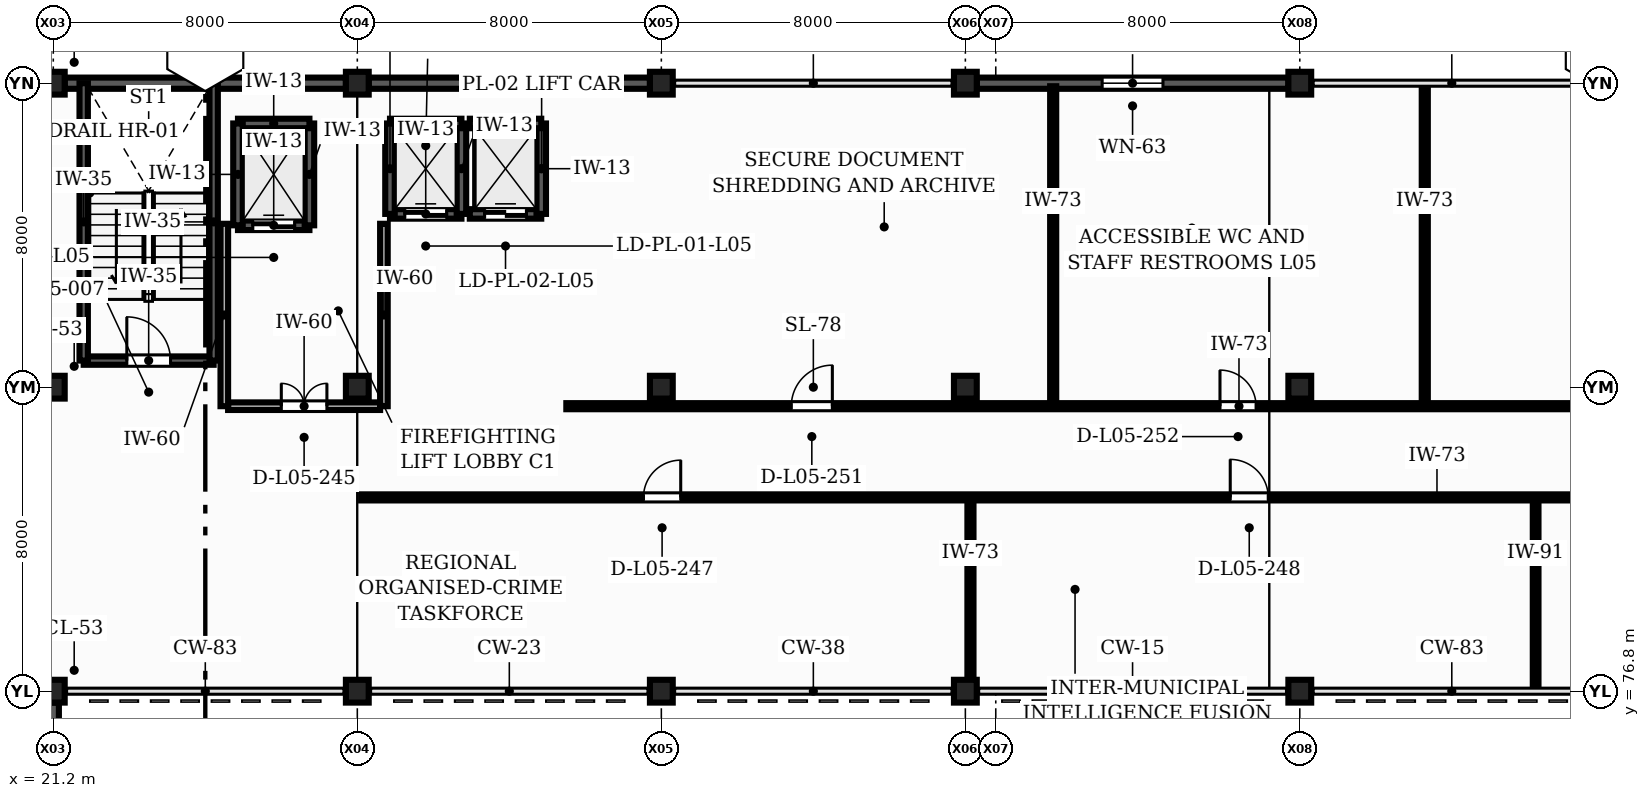
"""IFC4 building model, lengths in metres.
Left out: names, types, materials, properties, quantities, classifications, styles, units other than length and angle.
Written with IfcOpenShell. Run it as: python <this file> out.ifc"""

import sys

from ifc_helpers import new_model, si_unit, direction, frame, frame_2d, origin, origin_2d, place, context, subcontext, project, spatial, rectangle, extrude, element, fill, save


model = new_model("IFC4")
c1 = context("Model", 3, precision=1e-05, world=origin(), true_north=direction((0.0, 1.0)))
c2 = subcontext(c1, "Body", "Model", "MODEL_VIEW")
j1 = project(units=[si_unit("LENGTHUNIT", "METRE"), si_unit("PLANEANGLEUNIT", "RADIAN")], contexts=[c1])
p1 = place(None, origin())
s1 = spatial("IfcSite", under=j1, at=p1, CompositionType="ELEMENT")
p2 = place(p1, origin())
s2 = spatial("IfcBuilding", under=s1, at=p2, CompositionType="ELEMENT")
p3 = place(p2, frame((0.0, 0.0, 21.9)))
s3 = spatial("IfcBuildingStorey", under=s2, at=p3, CompositionType="ELEMENT", Elevation=21.9)
for number, where, z_axis, x_axis in (
    (1, (21.2, 76.8, 0.0), (0.0, 0.0, 1.0), (1.0, 0.0, 0.0)),
    (2, (21.2, 84.8, 0.0), (0.0, 0.0, 1.0), (1.0, 0.0, 0.0)),
    (3, (21.2, 92.8, 0.0), (0.0, 0.0, 1.0), (1.0, 0.0, 0.0)),
    (4, (29.2, 76.8, 0.0), (0.0, 0.0, 1.0), (1.0, 0.0, 0.0)),
    (5, (29.2, 84.8, 0.0), (0.0, 0.0, 1.0), (1.0, 0.0, 0.0)),
    (6, (29.2, 92.8, 0.0), (0.0, 0.0, 1.0), (1.0, 0.0, 0.0)),
    (7, (37.2, 76.8, 0.0), (0.0, 0.0, 1.0), (1.0, 0.0, 0.0)),
    (8, (37.2, 84.8, 0.0), (0.0, 0.0, 1.0), (1.0, 0.0, 0.0)),
    (9, (37.2, 92.8, 0.0), (0.0, 0.0, 1.0), (1.0, 0.0, 0.0)),
    (10, (45.2, 76.8, 0.0), (0.0, 0.0, 1.0), (1.0, 0.0, 0.0)),
    (11, (45.2, 84.8, 0.0), (0.0, 0.0, 1.0), (1.0, 0.0, 0.0)),
    (12, (45.2, 92.8, 0.0), (0.0, 0.0, 1.0), (1.0, 0.0, 0.0)),
    (13, (54.0, 76.8, 0.0), (0.0, 0.0, 1.0), (1.0, 0.0, 0.0)),
    (14, (54.0, 84.8, 0.0), (0.0, 0.0, 1.0), (1.0, 0.0, 0.0)),
    (15, (54.0, 92.8, 0.0), (0.0, 0.0, 1.0), (1.0, 0.0, 0.0)),
):
    element("IfcColumn", number, at=place(p3, frame(where, z_axis=z_axis, x_axis=x_axis)), inside=s3, PredefinedType="COLUMN", context=c2, shape_type="SweptSolid", body=[
        extrude(rectangle(XDim=0.6, YDim=0.6, at=origin_2d()), origin(), (0.0, 0.0, 1.0), 3.9),
    ])
p4 = place(p3, frame((21.2, 69.05, 0.0), z_axis=(0.0, 0.0, 1.0), x_axis=(0.0, 1.0, 0.0)))
e16 = element("IfcWall", 16, at=p4, inside=s3, PredefinedType="SOLIDWALL", context=c2, shape_type="SweptSolid", body=[
    extrude(rectangle(XDim=7.45, YDim=0.295, at=frame_2d((3.725, 0.0))), origin(), (0.0, 0.0, 1.0), 3.0),
])
p5 = place(p4, frame((2.725, 0.0, 0.9)))
e17 = element("IfcOpeningElement", 17, at=p5, cuts=e16, PredefinedType="OPENING", context=c2, shape_type="SweptSolid", body=[
    extrude(rectangle(XDim=2.0, YDim=1.5, at=frame_2d((1.0, 0.75))), frame((0.0, 0.157, 0.0), z_axis=(0.0, -1.0, 0.0), x_axis=(1.0, 0.0, 0.0)), (0.0, 0.0, 1.0), 0.315),
])
p6 = place(p3, frame((53.7, 92.8, 0.0), z_axis=(0.0, 0.0, 1.0), x_axis=(-1.0, 0.0, 0.0)))
e18 = element("IfcWall", 18, at=p6, inside=s3, PredefinedType="SOLIDWALL", context=c2, shape_type="SweptSolid", body=[
    extrude(rectangle(XDim=8.2, YDim=0.295, at=frame_2d((4.1, 0.0))), origin(), (0.0, 0.0, 1.0), 3.0),
])
p7 = place(p6, frame((3.3, 0.0, 0.9)))
e19 = element("IfcOpeningElement", 19, at=p7, cuts=e18, PredefinedType="OPENING", context=c2, shape_type="SweptSolid", body=[
    extrude(rectangle(XDim=1.6, YDim=1.25, at=frame_2d((0.8, 0.625))), frame((0.0, 0.157, 0.0), z_axis=(0.0, -1.0, 0.0), x_axis=(1.0, 0.0, 0.0)), (0.0, 0.0, 1.0), 0.315),
])
p8 = place(p3, frame((36.9, 92.8, 0.0), z_axis=(0.0, 0.0, 1.0), x_axis=(-1.0, 0.0, 0.0)))
e20 = element("IfcWall", 20, at=p8, inside=s3, PredefinedType="SOLIDWALL", context=c2, shape_type="SweptSolid", body=[
    extrude(rectangle(XDim=7.4, YDim=0.295, at=frame_2d((3.7, 0.0))), origin(), (0.0, 0.0, 1.0), 3.0),
])
p9 = place(p3, frame((28.9, 92.8, 0.0), z_axis=(0.0, 0.0, 1.0), x_axis=(-1.0, 0.0, 0.0)))
e21 = element("IfcWall", 21, at=p9, inside=s3, PredefinedType="SOLIDWALL", context=c2, shape_type="SweptSolid", body=[
    extrude(rectangle(XDim=7.4, YDim=0.295, at=frame_2d((3.7, 0.0))), origin(), (0.0, 0.0, 1.0), 3.65),
])
p10 = place(p3, frame((22.0, 85.5, 0.0), z_axis=(0.0, 0.0, 1.0), x_axis=(1.0, 0.0, 0.0)))
e22 = element("IfcWall", 22, at=p10, inside=s3, PredefinedType="SHEAR", context=c2, shape_type="SweptSolid", body=[
    extrude(rectangle(XDim=3.42, YDim=0.22, at=frame_2d((1.71, 0.0))), origin(), (0.0, 0.0, 1.0), 3.9),
])
p11 = place(p10, frame((1.135, 0.0, 0.0)))
e23 = element("IfcOpeningElement", 23, at=p11, cuts=e22, PredefinedType="OPENING", context=c2, shape_type="SweptSolid", body=[
    extrude(rectangle(XDim=1.15, YDim=2.15, at=frame_2d((0.575, 1.075))), frame((0.0, 0.12, 0.0), z_axis=(0.0, -1.0, 0.0), x_axis=(1.0, 0.0, 0.0)), (0.0, 0.0, 1.0), 0.24),
])
for number, where, z_axis, x_axis in (
    (24, (25.42, 85.5, 0.0), (0.0, 0.0, 1.0), (0.0, 1.0, 0.0)),
    (25, (22.0, 92.8, 0.0), (0.0, 0.0, 1.0), (0.0, -1.0, 0.0)),
):
    element("IfcWall", number, at=place(p3, frame(where, z_axis=z_axis, x_axis=x_axis)), inside=s3, PredefinedType="SHEAR", context=c2, shape_type="SweptSolid", body=[
        extrude(rectangle(XDim=7.3, YDim=0.22, at=frame_2d((3.65, 0.0))), origin(), (0.0, 0.0, 1.0), 3.9),
    ])
p12 = place(p3, frame((26.06, 89.06, 0.0), z_axis=(0.0, 0.0, 1.0), x_axis=(1.0, 0.0, 0.0)))
e26 = element("IfcWall", 26, at=p12, inside=s3, PredefinedType="SHEAR", context=c2, shape_type="SweptSolid", body=[
    extrude(rectangle(XDim=1.88, YDim=0.25, at=frame_2d((0.94, 0.0))), origin(), (0.0, 0.0, 1.0), 3.9),
])
p13 = place(p12, frame((0.39, 0.0, 0.0)))
e27 = element("IfcOpeningElement", 27, at=p13, cuts=e26, PredefinedType="OPENING", context=c2, shape_type="SweptSolid", body=[
    extrude(rectangle(XDim=1.1, YDim=2.2, at=frame_2d((0.55, 1.1))), frame((0.0, 0.135, 0.0), z_axis=(0.0, -1.0, 0.0), x_axis=(1.0, 0.0, 0.0)), (0.0, 0.0, 1.0), 0.27),
])
p14 = place(p3, frame((27.94, 89.06, 0.0), z_axis=(0.0, 0.0, 1.0), x_axis=(0.0, 1.0, 0.0)))
e28 = element("IfcWall", 28, at=p14, inside=s3, PredefinedType="SHEAR", context=c2, shape_type="SweptSolid", body=[
    extrude(rectangle(XDim=2.68, YDim=0.25, at=frame_2d((1.34, 0.0))), origin(), (0.0, 0.0, 1.0), 3.9),
])
p15 = place(p3, frame((27.94, 91.74, 0.0), z_axis=(0.0, 0.0, 1.0), x_axis=(-1.0, 0.0, 0.0)))
e29 = element("IfcWall", 29, at=p15, inside=s3, PredefinedType="SHEAR", context=c2, shape_type="SweptSolid", body=[
    extrude(rectangle(XDim=1.88, YDim=0.25, at=frame_2d((0.94, 0.0))), origin(), (0.0, 0.0, 1.0), 3.9),
])
p16 = place(p3, frame((26.06, 91.74, 0.0), z_axis=(0.0, 0.0, 1.0), x_axis=(0.0, -1.0, 0.0)))
e30 = element("IfcWall", 30, at=p16, inside=s3, PredefinedType="SHEAR", context=c2, shape_type="SweptSolid", body=[
    extrude(rectangle(XDim=2.68, YDim=0.25, at=frame_2d((1.34, 0.0))), origin(), (0.0, 0.0, 1.0), 3.9),
])
p17 = place(p3, frame((30.06, 89.36, 0.0), z_axis=(0.0, 0.0, 1.0), x_axis=(1.0, 0.0, 0.0)))
e31 = element("IfcWall", 31, at=p17, inside=s3, PredefinedType="SHEAR", context=c2, shape_type="SweptSolid", body=[
    extrude(rectangle(XDim=1.88, YDim=0.25, at=frame_2d((0.94, 0.0))), origin(), (0.0, 0.0, 1.0), 3.9),
])
p18 = place(p17, frame((0.39, 0.0, 0.0)))
e32 = element("IfcOpeningElement", 32, at=p18, cuts=e31, PredefinedType="OPENING", context=c2, shape_type="SweptSolid", body=[
    extrude(rectangle(XDim=1.1, YDim=2.2, at=frame_2d((0.55, 1.1))), frame((0.0, 0.135, 0.0), z_axis=(0.0, -1.0, 0.0), x_axis=(1.0, 0.0, 0.0)), (0.0, 0.0, 1.0), 0.27),
])
p19 = place(p3, frame((31.94, 89.36, 0.0), z_axis=(0.0, 0.0, 1.0), x_axis=(0.0, 1.0, 0.0)))
e33 = element("IfcWall", 33, at=p19, inside=s3, PredefinedType="SHEAR", context=c2, shape_type="SweptSolid", body=[
    extrude(rectangle(XDim=2.38, YDim=0.25, at=frame_2d((1.19, 0.0))), origin(), (0.0, 0.0, 1.0), 3.9),
])
p20 = place(p3, frame((31.94, 91.74, 0.0), z_axis=(0.0, 0.0, 1.0), x_axis=(-1.0, 0.0, 0.0)))
e34 = element("IfcWall", 34, at=p20, inside=s3, PredefinedType="SHEAR", context=c2, shape_type="SweptSolid", body=[
    extrude(rectangle(XDim=1.88, YDim=0.25, at=frame_2d((0.94, 0.0))), origin(), (0.0, 0.0, 1.0), 3.9),
])
p21 = place(p3, frame((30.06, 91.74, 0.0), z_axis=(0.0, 0.0, 1.0), x_axis=(0.0, -1.0, 0.0)))
e35 = element("IfcWall", 35, at=p21, inside=s3, PredefinedType="SHEAR", context=c2, shape_type="SweptSolid", body=[
    extrude(rectangle(XDim=2.38, YDim=0.25, at=frame_2d((1.19, 0.0))), origin(), (0.0, 0.0, 1.0), 3.9),
])
p22 = place(p3, frame((32.16, 89.36, 0.0), z_axis=(0.0, 0.0, 1.0), x_axis=(1.0, 0.0, 0.0)))
e36 = element("IfcWall", 36, at=p22, inside=s3, PredefinedType="SHEAR", context=c2, shape_type="SweptSolid", body=[
    extrude(rectangle(XDim=1.88, YDim=0.25, at=frame_2d((0.94, 0.0))), origin(), (0.0, 0.0, 1.0), 3.9),
])
p23 = place(p22, frame((0.39, 0.0, 0.0)))
e37 = element("IfcOpeningElement", 37, at=p23, cuts=e36, PredefinedType="OPENING", context=c2, shape_type="SweptSolid", body=[
    extrude(rectangle(XDim=1.1, YDim=2.2, at=frame_2d((0.55, 1.1))), frame((0.0, 0.135, 0.0), z_axis=(0.0, -1.0, 0.0), x_axis=(1.0, 0.0, 0.0)), (0.0, 0.0, 1.0), 0.27),
])
p24 = place(p3, frame((34.04, 89.36, 0.0), z_axis=(0.0, 0.0, 1.0), x_axis=(0.0, 1.0, 0.0)))
e38 = element("IfcWall", 38, at=p24, inside=s3, PredefinedType="SHEAR", context=c2, shape_type="SweptSolid", body=[
    extrude(rectangle(XDim=2.38, YDim=0.25, at=frame_2d((1.19, 0.0))), origin(), (0.0, 0.0, 1.0), 3.9),
])
p25 = place(p3, frame((34.04, 91.74, 0.0), z_axis=(0.0, 0.0, 1.0), x_axis=(-1.0, 0.0, 0.0)))
e39 = element("IfcWall", 39, at=p25, inside=s3, PredefinedType="SHEAR", context=c2, shape_type="SweptSolid", body=[
    extrude(rectangle(XDim=1.88, YDim=0.25, at=frame_2d((0.94, 0.0))), origin(), (0.0, 0.0, 1.0), 3.9),
])
p26 = place(p3, frame((25.8, 84.3, 0.0), z_axis=(0.0, 0.0, 1.0), x_axis=(1.0, 0.0, 0.0)))
e40 = element("IfcWall", 40, at=p26, inside=s3, PredefinedType="PARTITIONING", context=c2, shape_type="SweptSolid", body=[
    extrude(rectangle(XDim=4.0, YDim=0.2, at=frame_2d((2.0, 0.0))), origin(), (0.0, 0.0, 1.0), 2.785),
])
p27 = place(p26, frame((1.4, 0.0, 0.0)))
e41 = element("IfcOpeningElement", 41, at=p27, cuts=e40, PredefinedType="OPENING", context=c2, shape_type="SweptSolid", body=[
    extrude(rectangle(XDim=1.2, YDim=2.15, at=frame_2d((0.6, 1.075))), frame((0.0, 0.11, 0.0), z_axis=(0.0, -1.0, 0.0), x_axis=(1.0, 0.0, 0.0)), (0.0, 0.0, 1.0), 0.22),
])
p28 = place(p3, frame((25.7, 84.3, 0.0), z_axis=(0.0, 0.0, 1.0), x_axis=(0.0, 1.0, 0.0)))
e42 = element("IfcWall", 42, at=p28, inside=s3, PredefinedType="PARTITIONING", context=c2, shape_type="SweptSolid", body=[
    extrude(rectangle(XDim=4.8, YDim=0.2, at=frame_2d((2.4, 0.0))), origin(), (0.0, 0.0, 1.0), 2.985),
])
p29 = place(p3, frame((29.9, 84.3, 0.0), z_axis=(0.0, 0.0, 1.0), x_axis=(0.0, 1.0, 0.0)))
e43 = element("IfcWall", 43, at=p29, inside=s3, PredefinedType="PARTITIONING", context=c2, shape_type="SweptSolid", body=[
    extrude(rectangle(XDim=4.8, YDim=0.2, at=frame_2d((2.4, 0.0))), origin(), (0.0, 0.0, 1.0), 3.035),
])
p30 = place(p3, frame((45.334, 76.88, 0.0), z_axis=(0.0, 0.0, 1.0), x_axis=(0.0, 1.0, 0.0)))
e44 = element("IfcWall", 44, at=p30, inside=s3, PredefinedType="PARTITIONING", context=c2, shape_type="SweptSolid", body=[
    extrude(rectangle(XDim=4.92, YDim=0.16, at=frame_2d((2.46, 0.0))), origin(), (0.0, 0.0, 1.0), 2.785),
])
p31 = place(p3, frame((60.206, 76.88, 0.0), z_axis=(0.0, 0.0, 1.0), x_axis=(0.0, 1.0, 0.0)))
e45 = element("IfcWall", 45, at=p31, inside=s3, PredefinedType="PARTITIONING", context=c2, shape_type="SweptSolid", body=[
    extrude(rectangle(XDim=4.92, YDim=0.15, at=frame_2d((2.46, 0.0))), origin(), (0.0, 0.0, 1.0), 2.985),
])
p32 = place(p3, frame((29.3, 81.9, 0.0), z_axis=(0.0, 0.0, 1.0), x_axis=(1.0, 0.0, 0.0)))
e46 = element("IfcWall", 46, at=p32, inside=s3, PredefinedType="PARTITIONING", context=c2, shape_type="SweptSolid", body=[
    extrude(rectangle(XDim=56.62, YDim=0.16, at=frame_2d((28.31, 0.0))), origin(), (0.0, 0.0, 1.0), 2.785),
])
p33 = place(p32, frame((7.43, 0.0, 0.0)))
e47 = element("IfcOpeningElement", 47, at=p33, cuts=e46, PredefinedType="OPENING", context=c2, shape_type="SweptSolid", body=[
    extrude(rectangle(XDim=0.98, YDim=2.12, at=frame_2d((0.49, 1.06))), frame((0.0, 0.09, 0.0), z_axis=(0.0, -1.0, 0.0), x_axis=(1.0, 0.0, 0.0)), (0.0, 0.0, 1.0), 0.18),
])
p34 = place(p32, frame((22.87, 0.0, 0.0)))
e48 = element("IfcOpeningElement", 48, at=p34, cuts=e46, PredefinedType="OPENING", context=c2, shape_type="SweptSolid", body=[
    extrude(rectangle(XDim=1.0, YDim=2.1, at=frame_2d((0.5, 1.05))), frame((0.0, 0.09, 0.0), z_axis=(0.0, -1.0, 0.0), x_axis=(1.0, 0.0, 0.0)), (0.0, 0.0, 1.0), 0.18),
])
p35 = place(p32, frame((36.68, 0.0, 0.0)))
e49 = element("IfcOpeningElement", 49, at=p35, cuts=e46, PredefinedType="OPENING", context=c2, shape_type="SweptSolid", body=[
    extrude(rectangle(XDim=1.02, YDim=2.12, at=frame_2d((0.51, 1.06))), frame((0.0, 0.09, 0.0), z_axis=(0.0, -1.0, 0.0), x_axis=(1.0, 0.0, 0.0)), (0.0, 0.0, 1.0), 0.18),
])
p36 = place(p32, frame((49.47, 0.0, 0.0)))
e50 = element("IfcOpeningElement", 50, at=p36, cuts=e46, PredefinedType="OPENING", context=c2, shape_type="SweptSolid", body=[
    extrude(rectangle(XDim=1.05, YDim=2.1, at=frame_2d((0.525, 1.05))), frame((0.0, 0.09, 0.0), z_axis=(0.0, -1.0, 0.0), x_axis=(1.0, 0.0, 0.0)), (0.0, 0.0, 1.0), 0.18),
])
p37 = place(p3, frame((47.511, 84.5, 0.0), z_axis=(0.0, 0.0, 1.0), x_axis=(0.0, 1.0, 0.0)))
e51 = element("IfcWall", 51, at=p37, inside=s3, PredefinedType="PARTITIONING", context=c2, shape_type="SweptSolid", body=[
    extrude(rectangle(XDim=8.22, YDim=0.16, at=frame_2d((4.11, 0.0))), origin(), (0.0, 0.0, 1.0), 2.785),
])
p38 = place(p3, frame((57.289, 84.5, 0.0), z_axis=(0.0, 0.0, 1.0), x_axis=(0.0, 1.0, 0.0)))
e52 = element("IfcWall", 52, at=p38, inside=s3, PredefinedType="PARTITIONING", context=c2, shape_type="SweptSolid", body=[
    extrude(rectangle(XDim=8.22, YDim=0.16, at=frame_2d((4.11, 0.0))), origin(), (0.0, 0.0, 1.0), 2.885),
])
p39 = place(p3, frame((34.7, 84.3, 0.0), z_axis=(0.0, 0.0, 1.0), x_axis=(1.0, 0.0, 0.0)))
e53 = element("IfcWall", 53, at=p39, inside=s3, PredefinedType="PARTITIONING", context=c2, shape_type="SweptSolid", body=[
    extrude(rectangle(XDim=35.4, YDim=0.16, at=frame_2d((17.7, 0.0))), origin(), (0.0, 0.0, 1.0), 2.785),
])
p40 = place(p39, frame((5.92, 0.0, 0.0)))
e54 = element("IfcOpeningElement", 54, at=p40, cuts=e53, PredefinedType="OPENING", context=c2, shape_type="SweptSolid", body=[
    extrude(rectangle(XDim=1.08, YDim=2.14, at=frame_2d((0.54, 1.07))), frame((0.0, 0.09, 0.0), z_axis=(0.0, -1.0, 0.0), x_axis=(1.0, 0.0, 0.0)), (0.0, 0.0, 1.0), 0.18),
])
p41 = place(p39, frame((17.2, 0.0, 0.0)))
e55 = element("IfcOpeningElement", 55, at=p41, cuts=e53, PredefinedType="OPENING", context=c2, shape_type="SweptSolid", body=[
    extrude(rectangle(XDim=0.95, YDim=2.15, at=frame_2d((0.475, 1.075))), frame((0.0, 0.09, 0.0), z_axis=(0.0, -1.0, 0.0), x_axis=(1.0, 0.0, 0.0)), (0.0, 0.0, 1.0), 0.18),
])
p42 = place(p39, frame((28.48, 0.0, 0.0)))
e56 = element("IfcOpeningElement", 56, at=p42, cuts=e53, PredefinedType="OPENING", context=c2, shape_type="SweptSolid", body=[
    extrude(rectangle(XDim=0.9, YDim=2.1, at=frame_2d((0.45, 1.05))), frame((0.0, 0.09, 0.0), z_axis=(0.0, -1.0, 0.0), x_axis=(1.0, 0.0, 0.0)), (0.0, 0.0, 1.0), 0.18),
])
p43 = place(p7, origin())
e57 = element("IfcWindow", 57, at=p43, inside=s3, PartitioningType="SINGLE_PANEL", PredefinedType="WINDOW", context=c2, shape_type="SweptSolid", body=[
    extrude(rectangle(XDim=1.6, YDim=1.25, at=frame_2d((0.8, 0.625))), frame((0.0, 0.03, 0.0), z_axis=(0.0, -1.0, 0.0), x_axis=(1.0, 0.0, 0.0)), (0.0, 0.0, 1.0), 0.06),
])
fill(e19, e57)
p44 = place(p11, origin())
e58 = element("IfcDoor", 58, at=p44, inside=s3, OperationType="SINGLE_SWING_LEFT", PredefinedType="DOOR", context=c2, shape_type="SweptSolid", body=[
    extrude(rectangle(XDim=1.15, YDim=2.15, at=frame_2d((0.575, 1.075))), frame((0.0, 0.025, 0.0), z_axis=(0.0, -1.0, 0.0), x_axis=(1.0, 0.0, 0.0)), (0.0, 0.0, 1.0), 0.05),
])
fill(e23, e58)
p45 = place(p13, origin())
e59 = element("IfcDoor", 59, at=p45, inside=s3, OperationType="DOUBLE_DOOR_SLIDING", PredefinedType="DOOR", context=c2, shape_type="SweptSolid", body=[
    extrude(rectangle(XDim=1.1, YDim=2.2, at=frame_2d((0.55, 1.1))), frame((0.0, 0.025, 0.0), z_axis=(0.0, -1.0, 0.0), x_axis=(1.0, 0.0, 0.0)), (0.0, 0.0, 1.0), 0.05),
])
fill(e27, e59)
p46 = place(p18, origin())
e60 = element("IfcDoor", 60, at=p46, inside=s3, OperationType="DOUBLE_DOOR_SLIDING", PredefinedType="DOOR", context=c2, shape_type="SweptSolid", body=[
    extrude(rectangle(XDim=1.1, YDim=2.2, at=frame_2d((0.55, 1.1))), frame((0.0, 0.025, 0.0), z_axis=(0.0, -1.0, 0.0), x_axis=(1.0, 0.0, 0.0)), (0.0, 0.0, 1.0), 0.05),
])
fill(e32, e60)
p47 = place(p23, origin())
e61 = element("IfcDoor", 61, at=p47, inside=s3, OperationType="DOUBLE_DOOR_SLIDING", PredefinedType="DOOR", context=c2, shape_type="SweptSolid", body=[
    extrude(rectangle(XDim=1.1, YDim=2.2, at=frame_2d((0.55, 1.1))), frame((0.0, 0.025, 0.0), z_axis=(0.0, -1.0, 0.0), x_axis=(1.0, 0.0, 0.0)), (0.0, 0.0, 1.0), 0.05),
])
fill(e37, e61)
p48 = place(p27, origin())
e62 = element("IfcDoor", 62, at=p48, inside=s3, OperationType="DOUBLE_DOOR_SINGLE_SWING", PredefinedType="DOOR", context=c2, shape_type="SweptSolid", body=[
    extrude(rectangle(XDim=1.2, YDim=2.15, at=frame_2d((0.6, 1.075))), frame((0.0, 0.025, 0.0), z_axis=(0.0, -1.0, 0.0), x_axis=(1.0, 0.0, 0.0)), (0.0, 0.0, 1.0), 0.05),
])
fill(e41, e62)
p49 = place(p33, origin())
e63 = element("IfcDoor", 63, at=p49, inside=s3, OperationType="SINGLE_SWING_RIGHT", PredefinedType="DOOR", context=c2, shape_type="SweptSolid", body=[
    extrude(rectangle(XDim=0.98, YDim=2.12, at=frame_2d((0.49, 1.06))), frame((0.0, 0.025, 0.0), z_axis=(0.0, -1.0, 0.0), x_axis=(1.0, 0.0, 0.0)), (0.0, 0.0, 1.0), 0.05),
])
fill(e47, e63)
p50 = place(p34, origin())
e64 = element("IfcDoor", 64, at=p50, inside=s3, OperationType="SINGLE_SWING_LEFT", PredefinedType="DOOR", context=c2, shape_type="SweptSolid", body=[
    extrude(rectangle(XDim=1.0, YDim=2.1, at=frame_2d((0.5, 1.05))), frame((0.0, 0.025, 0.0), z_axis=(0.0, -1.0, 0.0), x_axis=(1.0, 0.0, 0.0)), (0.0, 0.0, 1.0), 0.05),
])
fill(e48, e64)
p51 = place(p40, origin())
e65 = element("IfcDoor", 65, at=p51, inside=s3, OperationType="SINGLE_SWING_RIGHT", PredefinedType="DOOR", context=c2, shape_type="SweptSolid", body=[
    extrude(rectangle(XDim=1.08, YDim=2.14, at=frame_2d((0.54, 1.07))), frame((0.0, 0.025, 0.0), z_axis=(0.0, -1.0, 0.0), x_axis=(1.0, 0.0, 0.0)), (0.0, 0.0, 1.0), 0.05),
])
fill(e54, e65)
p52 = place(p41, origin())
e66 = element("IfcDoor", 66, at=p52, inside=s3, OperationType="SINGLE_SWING_LEFT", PredefinedType="DOOR", context=c2, shape_type="SweptSolid", body=[
    extrude(rectangle(XDim=0.95, YDim=2.15, at=frame_2d((0.475, 1.075))), frame((0.0, 0.025, 0.0), z_axis=(0.0, -1.0, 0.0), x_axis=(1.0, 0.0, 0.0)), (0.0, 0.0, 1.0), 0.05),
])
fill(e55, e66)
save(model, sys.argv[1])
